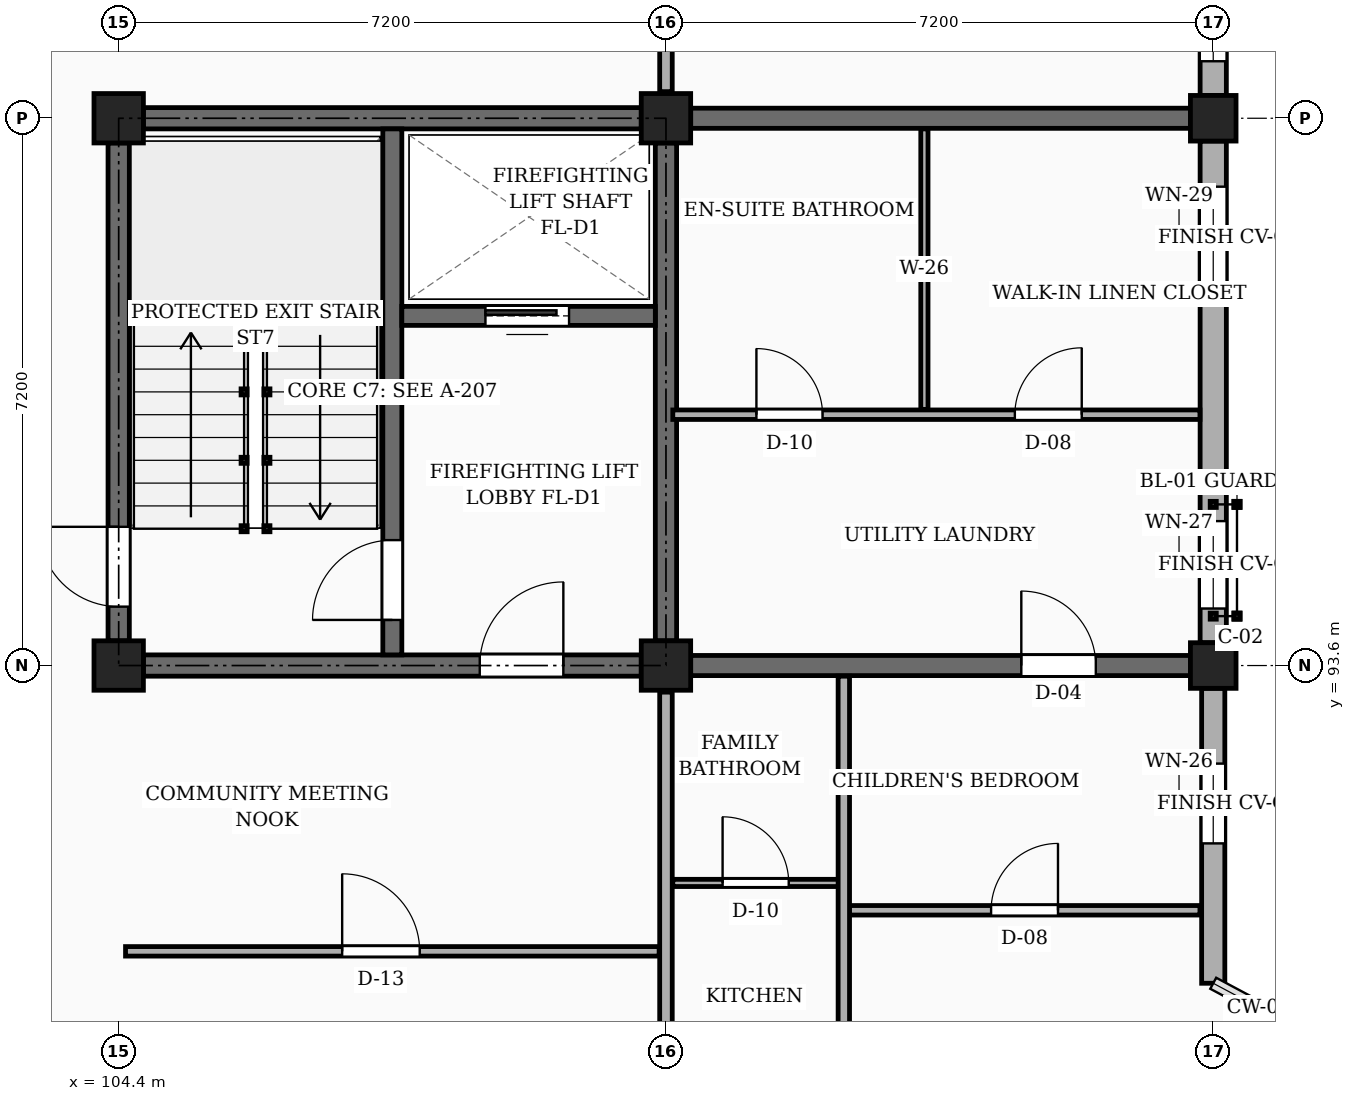
"""IFC4 building model, lengths in metres.
Left out: names, types, materials, properties, quantities, classifications, styles, units other than length and angle.
Written with IfcOpenShell. Run it as: python <this file> out.ifc"""

import sys

from ifc_helpers import new_model, si_unit, direction, frame, frame_2d, origin, origin_2d, place, context, subcontext, project, spatial, rectangle, extrude, element, fill, save


model = new_model("IFC4")
c1 = context("Model", 3, precision=1e-05, world=origin(), true_north=direction((0.0, 1.0)))
c2 = subcontext(c1, "Body", "Model", "MODEL_VIEW")
j1 = project(units=[si_unit("LENGTHUNIT", "METRE"), si_unit("PLANEANGLEUNIT", "RADIAN")], contexts=[c1])
p1 = place(None, origin())
s1 = spatial("IfcSite", under=j1, at=p1, CompositionType="ELEMENT")
p2 = place(p1, origin())
s2 = spatial("IfcBuilding", under=s1, at=p2, CompositionType="ELEMENT")
p3 = place(p2, frame((0.0, 0.0, 7.65)))
s3 = spatial("IfcBuildingStorey", under=s2, at=p3, CompositionType="ELEMENT", Elevation=7.65)
for number, where, z_axis, x_axis in (
    (1, (104.4, 93.6, 0.0), (0.0, 0.0, 1.0), (1.0, 0.0, 0.0)),
    (2, (104.4, 100.8, 0.0), (0.0, 0.0, 1.0), (1.0, 0.0, 0.0)),
    (3, (111.6, 93.6, 0.0), (0.0, 0.0, 1.0), (1.0, 0.0, 0.0)),
    (4, (111.6, 100.8, 0.0), (0.0, 0.0, 1.0), (1.0, 0.0, 0.0)),
):
    element("IfcColumn", number, at=place(p3, frame(where, z_axis=z_axis, x_axis=x_axis)), inside=s3, PredefinedType="COLUMN", context=c2, shape_type="SweptSolid", body=[
        extrude(rectangle(XDim=0.65, YDim=0.65, at=origin_2d()), origin(), (0.0, 0.0, 1.0), 3.15),
    ])
for number, where, z_axis, x_axis in (
    (5, (118.8, 93.6, 0.0), (0.0, 0.0, 1.0), (1.0, 0.0, 0.0)),
    (6, (118.8, 100.8, 0.0), (0.0, 0.0, 1.0), (1.0, 0.0, 0.0)),
):
    element("IfcColumn", number, at=place(p3, frame(where, z_axis=z_axis, x_axis=x_axis)), inside=s3, PredefinedType="COLUMN", context=c2, shape_type="SweptSolid", body=[
        extrude(rectangle(XDim=0.6, YDim=0.6, at=origin_2d()), origin(), (0.0, 0.0, 1.0), 3.15),
    ])
p4 = place(p3, frame((111.925, 93.6, 0.0), z_axis=(0.0, 0.0, 1.0), x_axis=(1.0, 0.0, 0.0)))
e7 = element("IfcWall", 7, at=p4, inside=s3, PredefinedType="SOLIDWALL", context=c2, shape_type="SweptSolid", body=[
    extrude(rectangle(XDim=6.575, YDim=0.265, at=frame_2d((3.288, 0.0))), origin(), (0.0, 0.0, 1.0), 2.19),
])
p5 = place(p4, frame((4.35, 0.0, 0.0)))
e8 = element("IfcOpeningElement", 8, at=p5, cuts=e7, PredefinedType="OPENING", context=c2, shape_type="SweptSolid", body=[
    extrude(rectangle(XDim=0.98, YDim=2.12, at=frame_2d((0.49, 1.06))), frame((0.0, 0.143, 0.0), z_axis=(0.0, -1.0, 0.0), x_axis=(1.0, 0.0, 0.0)), (0.0, 0.0, 1.0), 0.285),
])
p6 = place(p3, frame((111.925, 100.8, 0.0), z_axis=(0.0, 0.0, 1.0), x_axis=(1.0, 0.0, 0.0)))
e9 = element("IfcWall", 9, at=p6, inside=s3, PredefinedType="SOLIDWALL", context=c2, shape_type="SweptSolid", body=[
    extrude(rectangle(XDim=6.575, YDim=0.265, at=frame_2d((3.288, 0.0))), origin(), (0.0, 0.0, 1.0), 2.19),
])
p7 = place(p3, frame((118.8, 89.42, 0.0), z_axis=(0.0, 0.0, 1.0), x_axis=(0.0, 1.0, 0.0)))
e10 = element("IfcWall", 10, at=p7, inside=s3, PredefinedType="SOLIDWALL", context=c2, shape_type="SweptSolid", body=[
    extrude(rectangle(XDim=3.88, YDim=0.305, at=frame_2d((1.94, 0.0))), origin(), (0.0, 0.0, 1.0), 2.46),
])
p8 = place(p7, frame((1.84, 0.0, 0.78)))
e11 = element("IfcOpeningElement", 11, at=p8, cuts=e10, PredefinedType="OPENING", context=c2, shape_type="SweptSolid", body=[
    extrude(rectangle(XDim=1.05, YDim=1.44, at=frame_2d((0.525, 0.72))), frame((0.0, 0.163, 0.0), z_axis=(0.0, -1.0, 0.0), x_axis=(1.0, 0.0, 0.0)), (0.0, 0.0, 1.0), 0.325),
])
p9 = place(p3, frame((118.8, 93.9, 0.0), z_axis=(0.0, 0.0, 1.0), x_axis=(0.0, 1.0, 0.0)))
e12 = element("IfcWall", 12, at=p9, inside=s3, PredefinedType="SOLIDWALL", context=c2, shape_type="SweptSolid", body=[
    extrude(rectangle(XDim=6.6, YDim=0.345, at=frame_2d((3.3, 0.0))), origin(), (0.0, 0.0, 1.0), 2.46),
])
p10 = place(p9, frame((0.45, 0.0, 0.78)))
e13 = element("IfcOpeningElement", 13, at=p10, cuts=e12, PredefinedType="OPENING", context=c2, shape_type="SweptSolid", body=[
    extrude(rectangle(XDim=1.15, YDim=1.44, at=frame_2d((0.575, 0.72))), frame((0.0, 0.183, 0.0), z_axis=(0.0, -1.0, 0.0), x_axis=(1.0, 0.0, 0.0)), (0.0, 0.0, 1.0), 0.365),
])
p11 = place(p9, frame((4.65, 0.0, 0.78)))
e14 = element("IfcOpeningElement", 14, at=p11, cuts=e12, PredefinedType="OPENING", context=c2, shape_type="SweptSolid", body=[
    extrude(rectangle(XDim=1.35, YDim=1.44, at=frame_2d((0.675, 0.72))), frame((0.0, 0.183, 0.0), z_axis=(0.0, -1.0, 0.0), x_axis=(1.0, 0.0, 0.0)), (0.0, 0.0, 1.0), 0.365),
])
p12 = place(p3, frame((118.8, 101.1, 0.0), z_axis=(0.0, 0.0, 1.0), x_axis=(0.0, 1.0, 0.0)))
e15 = element("IfcWall", 15, at=p12, inside=s3, PredefinedType="SOLIDWALL", context=c2, shape_type="SweptSolid", body=[
    extrude(rectangle(XDim=6.6, YDim=0.345, at=frame_2d((3.3, 0.0))), origin(), (0.0, 0.0, 1.0), 2.46),
])
p13 = place(p12, frame((0.45, 0.0, 0.78)))
e16 = element("IfcOpeningElement", 16, at=p13, cuts=e15, PredefinedType="OPENING", context=c2, shape_type="SweptSolid", body=[
    extrude(rectangle(XDim=1.35, YDim=1.44, at=frame_2d((0.675, 0.72))), frame((0.0, 0.183, 0.0), z_axis=(0.0, -1.0, 0.0), x_axis=(1.0, 0.0, 0.0)), (0.0, 0.0, 1.0), 0.365),
])
p14 = place(p12, frame((4.65, 0.0, 0.78)))
e17 = element("IfcOpeningElement", 17, at=p14, cuts=e15, PredefinedType="OPENING", context=c2, shape_type="SweptSolid", body=[
    extrude(rectangle(XDim=0.85, YDim=1.15, at=frame_2d((0.425, 0.575))), frame((0.0, 0.183, 0.0), z_axis=(0.0, -1.0, 0.0), x_axis=(1.0, 0.0, 0.0)), (0.0, 0.0, 1.0), 0.365),
])
p15 = place(p3, frame((104.4, 93.925, 0.0), z_axis=(0.0, 0.0, 1.0), x_axis=(0.0, 1.0, 0.0)))
e18 = element("IfcWall", 18, at=p15, inside=s3, PredefinedType="SHEAR", context=c2, shape_type="SweptSolid", body=[
    extrude(rectangle(XDim=6.55, YDim=0.28, at=frame_2d((3.275, 0.0))), origin(), (0.0, 0.0, 1.0), 2.89),
])
p16 = place(p15, frame((0.45, 0.0, 0.0)))
e19 = element("IfcOpeningElement", 19, at=p16, cuts=e18, PredefinedType="OPENING", context=c2, shape_type="SweptSolid", body=[
    extrude(rectangle(XDim=1.05, YDim=2.15, at=frame_2d((0.525, 1.075))), frame((0.0, 0.15, 0.0), z_axis=(0.0, -1.0, 0.0), x_axis=(1.0, 0.0, 0.0)), (0.0, 0.0, 1.0), 0.3),
])
p17 = place(p3, frame((104.725, 100.8, 0.0), z_axis=(0.0, 0.0, 1.0), x_axis=(1.0, 0.0, 0.0)))
e20 = element("IfcWall", 20, at=p17, inside=s3, PredefinedType="SHEAR", context=c2, shape_type="SweptSolid", body=[
    extrude(rectangle(XDim=6.55, YDim=0.28, at=frame_2d((3.275, 0.0))), origin(), (0.0, 0.0, 1.0), 2.89),
])
p18 = place(p3, frame((111.6, 93.925, 0.0), z_axis=(0.0, 0.0, 1.0), x_axis=(0.0, 1.0, 0.0)))
e21 = element("IfcWall", 21, at=p18, inside=s3, PredefinedType="SHEAR", context=c2, shape_type="SweptSolid", body=[
    extrude(rectangle(XDim=6.55, YDim=0.28, at=frame_2d((3.275, 0.0))), origin(), (0.0, 0.0, 1.0), 2.89),
])
p19 = place(p3, frame((104.725, 93.6, 0.0), z_axis=(0.0, 0.0, 1.0), x_axis=(1.0, 0.0, 0.0)))
e22 = element("IfcWall", 22, at=p19, inside=s3, PredefinedType="SHEAR", context=c2, shape_type="SweptSolid", body=[
    extrude(rectangle(XDim=6.55, YDim=0.28, at=frame_2d((3.275, 0.0))), origin(), (0.0, 0.0, 1.0), 2.89),
])
p20 = place(p19, frame((4.425, 0.0, 0.0)))
e23 = element("IfcOpeningElement", 23, at=p20, cuts=e22, PredefinedType="OPENING", context=c2, shape_type="SweptSolid", body=[
    extrude(rectangle(XDim=1.1, YDim=2.15, at=frame_2d((0.55, 1.075))), frame((0.0, 0.15, 0.0), z_axis=(0.0, -1.0, 0.0), x_axis=(1.0, 0.0, 0.0)), (0.0, 0.0, 1.0), 0.3),
])
p21 = place(p3, frame((108.0, 93.74, 0.0), z_axis=(0.0, 0.0, 1.0), x_axis=(0.0, 1.0, 0.0)))
e24 = element("IfcWall", 24, at=p21, inside=s3, PredefinedType="SHEAR", context=c2, shape_type="SweptSolid", body=[
    extrude(rectangle(XDim=6.92, YDim=0.25, at=frame_2d((3.46, 0.0))), origin(), (0.0, 0.0, 1.0), 2.89),
])
p22 = place(p21, frame((0.46, 0.0, 0.0)))
e25 = element("IfcOpeningElement", 25, at=p22, cuts=e24, PredefinedType="OPENING", context=c2, shape_type="SweptSolid", body=[
    extrude(rectangle(XDim=1.05, YDim=2.15, at=frame_2d((0.525, 1.075))), frame((0.0, 0.135, 0.0), z_axis=(0.0, -1.0, 0.0), x_axis=(1.0, 0.0, 0.0)), (0.0, 0.0, 1.0), 0.27),
])
p23 = place(p3, frame((108.125, 98.2, 0.0), z_axis=(0.0, 0.0, 1.0), x_axis=(1.0, 0.0, 0.0)))
e26 = element("IfcWall", 26, at=p23, inside=s3, PredefinedType="SHEAR", context=c2, shape_type="SweptSolid", body=[
    extrude(rectangle(XDim=3.335, YDim=0.25, at=frame_2d((1.667, 0.0))), origin(), (0.0, 0.0, 1.0), 2.89),
])
p24 = place(p23, frame((1.1, 0.0, 0.0)))
e27 = element("IfcOpeningElement", 27, at=p24, cuts=e26, PredefinedType="OPENING", context=c2, shape_type="SweptSolid", body=[
    extrude(rectangle(XDim=1.1, YDim=2.2, at=frame_2d((0.55, 1.1))), frame((0.0, 0.135, 0.0), z_axis=(0.0, -1.0, 0.0), x_axis=(1.0, 0.0, 0.0)), (0.0, 0.0, 1.0), 0.27),
])
p25 = place(p3, frame((111.6, 86.75, 0.0), z_axis=(0.0, 0.0, 1.0), x_axis=(0.0, 1.0, 0.0)))
e28 = element("IfcWall", 28, at=p25, inside=s3, PredefinedType="PARTITIONING", context=c2, shape_type="SweptSolid", body=[
    extrude(rectangle(XDim=6.5, YDim=0.165, at=frame_2d((3.25, 0.0))), origin(), (0.0, 0.0, 1.0), 2.24),
])
p26 = place(p25, frame((1.0, 0.0, 0.0)))
e29 = element("IfcOpeningElement", 29, at=p26, cuts=e28, PredefinedType="OPENING", context=c2, shape_type="SweptSolid", body=[
    extrude(rectangle(XDim=1.14, YDim=2.18, at=frame_2d((0.57, 1.09))), frame((0.0, 0.093, 0.0), z_axis=(0.0, -1.0, 0.0), x_axis=(1.0, 0.0, 0.0)), (0.0, 0.0, 1.0), 0.185),
])
p27 = place(p3, frame((111.6, 101.15, 0.0), z_axis=(0.0, 0.0, 1.0), x_axis=(0.0, 1.0, 0.0)))
e30 = element("IfcWall", 30, at=p27, inside=s3, PredefinedType="PARTITIONING", context=c2, shape_type="SweptSolid", body=[
    extrude(rectangle(XDim=6.5, YDim=0.165, at=frame_2d((3.25, 0.0))), origin(), (0.0, 0.0, 1.0), 2.24),
])
p28 = place(p27, frame((1.1, 0.0, 0.0)))
e31 = element("IfcOpeningElement", 31, at=p28, cuts=e30, PredefinedType="OPENING", context=c2, shape_type="SweptSolid", body=[
    extrude(rectangle(XDim=1.0, YDim=2.15, at=frame_2d((0.5, 1.075))), frame((0.0, 0.093, 0.0), z_axis=(0.0, -1.0, 0.0), x_axis=(1.0, 0.0, 0.0)), (0.0, 0.0, 1.0), 0.185),
])
p29 = place(p3, frame((104.49, 89.84, 0.0), z_axis=(0.0, 0.0, 1.0), x_axis=(1.0, 0.0, 0.0)))
e32 = element("IfcWall", 32, at=p29, inside=s3, PredefinedType="PARTITIONING", context=c2, shape_type="SweptSolid", body=[
    extrude(rectangle(XDim=7.02, YDim=0.125, at=frame_2d((3.51, 0.0))), origin(), (0.0, 0.0, 1.0), 2.325),
])
p30 = place(p29, frame((2.85, 0.0, 0.0)))
e33 = element("IfcOpeningElement", 33, at=p30, cuts=e32, PredefinedType="OPENING", context=c2, shape_type="SweptSolid", body=[
    extrude(rectangle(XDim=1.02, YDim=2.15, at=frame_2d((0.51, 1.075))), frame((0.0, 0.073, 0.0), z_axis=(0.0, -1.0, 0.0), x_axis=(1.0, 0.0, 0.0)), (0.0, 0.0, 1.0), 0.145),
])
p31 = place(p3, frame((114.01, 90.38, 0.0), z_axis=(0.0, 0.0, 1.0), x_axis=(1.0, 0.0, 0.0)))
e34 = element("IfcWall", 34, at=p31, inside=s3, PredefinedType="PARTITIONING", context=c2, shape_type="SweptSolid", body=[
    extrude(rectangle(XDim=4.615, YDim=0.125, at=frame_2d((2.308, 0.0))), origin(), (0.0, 0.0, 1.0), 2.325),
])
p32 = place(p31, frame((1.867, 0.0, 0.0)))
e35 = element("IfcOpeningElement", 35, at=p32, cuts=e34, PredefinedType="OPENING", context=c2, shape_type="SweptSolid", body=[
    extrude(rectangle(XDim=0.88, YDim=2.08, at=frame_2d((0.44, 1.04))), frame((0.0, 0.073, 0.0), z_axis=(0.0, -1.0, 0.0), x_axis=(1.0, 0.0, 0.0)), (0.0, 0.0, 1.0), 0.145),
])
p33 = place(p3, frame((111.69, 90.74, 0.0), z_axis=(0.0, 0.0, 1.0), x_axis=(1.0, 0.0, 0.0)))
e36 = element("IfcWall", 36, at=p33, inside=s3, PredefinedType="PARTITIONING", context=c2, shape_type="SweptSolid", body=[
    extrude(rectangle(XDim=2.18, YDim=0.095, at=frame_2d((1.09, 0.0))), origin(), (0.0, 0.0, 1.0), 2.325),
])
p34 = place(p33, frame((0.655, 0.0, 0.0)))
e37 = element("IfcOpeningElement", 37, at=p34, cuts=e36, PredefinedType="OPENING", context=c2, shape_type="SweptSolid", body=[
    extrude(rectangle(XDim=0.87, YDim=2.05, at=frame_2d((0.435, 1.025))), frame((0.0, 0.058, 0.0), z_axis=(0.0, -1.0, 0.0), x_axis=(1.0, 0.0, 0.0)), (0.0, 0.0, 1.0), 0.115),
])
p35 = place(p3, frame((113.94, 86.575, 0.0), z_axis=(0.0, 0.0, 1.0), x_axis=(0.0, 1.0, 0.0)))
e38 = element("IfcWall", 38, at=p35, inside=s3, PredefinedType="PARTITIONING", context=c2, shape_type="SweptSolid", body=[
    extrude(rectangle(XDim=6.885, YDim=0.15, at=frame_2d((3.442, 0.0))), origin(), (0.0, 0.0, 1.0), 2.325),
])
p36 = place(p35, frame((1.275, 0.0, 0.0)))
e39 = element("IfcOpeningElement", 39, at=p36, cuts=e38, PredefinedType="OPENING", context=c2, shape_type="SweptSolid", body=[
    extrude(rectangle(XDim=0.92, YDim=2.1, at=frame_2d((0.46, 1.05))), frame((0.0, 0.085, 0.0), z_axis=(0.0, -1.0, 0.0), x_axis=(1.0, 0.0, 0.0)), (0.0, 0.0, 1.0), 0.17),
])
p37 = place(p3, frame((111.69, 96.9, 0.0), z_axis=(0.0, 0.0, 1.0), x_axis=(1.0, 0.0, 0.0)))
e40 = element("IfcWall", 40, at=p37, inside=s3, PredefinedType="PARTITIONING", context=c2, shape_type="SweptSolid", body=[
    extrude(rectangle(XDim=6.935, YDim=0.125, at=frame_2d((3.468, 0.0))), origin(), (0.0, 0.0, 1.0), 2.325),
])
p38 = place(p37, frame((1.1, 0.0, 0.0)))
e41 = element("IfcOpeningElement", 41, at=p38, cuts=e40, PredefinedType="OPENING", context=c2, shape_type="SweptSolid", body=[
    extrude(rectangle(XDim=0.87, YDim=2.05, at=frame_2d((0.435, 1.025))), frame((0.0, 0.073, 0.0), z_axis=(0.0, -1.0, 0.0), x_axis=(1.0, 0.0, 0.0)), (0.0, 0.0, 1.0), 0.145),
])
p39 = place(p37, frame((4.5, 0.0, 0.0)))
e42 = element("IfcOpeningElement", 42, at=p39, cuts=e40, PredefinedType="OPENING", context=c2, shape_type="SweptSolid", body=[
    extrude(rectangle(XDim=0.88, YDim=2.08, at=frame_2d((0.44, 1.04))), frame((0.0, 0.073, 0.0), z_axis=(0.0, -1.0, 0.0), x_axis=(1.0, 0.0, 0.0)), (0.0, 0.0, 1.0), 0.145),
])
p40 = place(p3, frame((115.0, 96.97, 0.0), z_axis=(0.0, 0.0, 1.0), x_axis=(0.0, 1.0, 0.0)))
e43 = element("IfcWall", 43, at=p40, inside=s3, PredefinedType="PARTITIONING", context=c2, shape_type="SweptSolid", body=[
    extrude(rectangle(XDim=3.69, YDim=0.095, at=frame_2d((1.845, 0.0))), origin(), (0.0, 0.0, 1.0), 2.325),
])
p41 = place(p8, origin())
e44 = element("IfcWindow", 44, at=p41, inside=s3, PartitioningType="SINGLE_PANEL", PredefinedType="WINDOW", context=c2, shape_type="SweptSolid", body=[
    extrude(rectangle(XDim=1.05, YDim=1.44, at=frame_2d((0.525, 0.72))), frame((0.0, 0.03, 0.0), z_axis=(0.0, -1.0, 0.0), x_axis=(1.0, 0.0, 0.0)), (0.0, 0.0, 1.0), 0.06),
])
fill(e11, e44)
p42 = place(p10, origin())
e45 = element("IfcWindow", 45, at=p42, inside=s3, PartitioningType="SINGLE_PANEL", PredefinedType="WINDOW", context=c2, shape_type="SweptSolid", body=[
    extrude(rectangle(XDim=1.15, YDim=1.44, at=frame_2d((0.575, 0.72))), frame((0.0, 0.03, 0.0), z_axis=(0.0, -1.0, 0.0), x_axis=(1.0, 0.0, 0.0)), (0.0, 0.0, 1.0), 0.06),
])
fill(e13, e45)
p43 = place(p11, origin())
e46 = element("IfcWindow", 46, at=p43, inside=s3, PartitioningType="SINGLE_PANEL", PredefinedType="WINDOW", context=c2, shape_type="SweptSolid", body=[
    extrude(rectangle(XDim=1.35, YDim=1.44, at=frame_2d((0.675, 0.72))), frame((0.0, 0.03, 0.0), z_axis=(0.0, -1.0, 0.0), x_axis=(1.0, 0.0, 0.0)), (0.0, 0.0, 1.0), 0.06),
])
fill(e14, e46)
p44 = place(p13, origin())
e47 = element("IfcWindow", 47, at=p44, inside=s3, PartitioningType="SINGLE_PANEL", PredefinedType="WINDOW", context=c2, shape_type="SweptSolid", body=[
    extrude(rectangle(XDim=1.35, YDim=1.44, at=frame_2d((0.675, 0.72))), frame((0.0, 0.03, 0.0), z_axis=(0.0, -1.0, 0.0), x_axis=(1.0, 0.0, 0.0)), (0.0, 0.0, 1.0), 0.06),
])
fill(e16, e47)
p45 = place(p16, origin())
e48 = element("IfcDoor", 48, at=p45, inside=s3, OperationType="SINGLE_SWING_RIGHT", PredefinedType="DOOR", context=c2, shape_type="SweptSolid", body=[
    extrude(rectangle(XDim=1.05, YDim=2.15, at=frame_2d((0.525, 1.075))), frame((0.0, 0.025, 0.0), z_axis=(0.0, -1.0, 0.0), x_axis=(1.0, 0.0, 0.0)), (0.0, 0.0, 1.0), 0.05),
])
fill(e19, e48)
p46 = place(p20, frame((1.1, 0.0, 0.0), z_axis=(0.0, 0.0, 1.0), x_axis=(-1.0, 0.0, 0.0)))
e49 = element("IfcDoor", 49, at=p46, inside=s3, OperationType="SINGLE_SWING_RIGHT", PredefinedType="DOOR", context=c2, shape_type="SweptSolid", body=[
    extrude(rectangle(XDim=1.1, YDim=2.15, at=frame_2d((0.55, 1.075))), frame((0.0, 0.025, 0.0), z_axis=(0.0, -1.0, 0.0), x_axis=(1.0, 0.0, 0.0)), (0.0, 0.0, 1.0), 0.05),
])
fill(e23, e49)
p47 = place(p22, origin())
e50 = element("IfcDoor", 50, at=p47, inside=s3, OperationType="SINGLE_SWING_LEFT", PredefinedType="DOOR", context=c2, shape_type="SweptSolid", body=[
    extrude(rectangle(XDim=1.05, YDim=2.15, at=frame_2d((0.525, 1.075))), frame((0.0, 0.025, 0.0), z_axis=(0.0, -1.0, 0.0), x_axis=(1.0, 0.0, 0.0)), (0.0, 0.0, 1.0), 0.05),
])
fill(e25, e50)
p48 = place(p24, origin())
e51 = element("IfcDoor", 51, at=p48, inside=s3, OperationType="SLIDING_TO_LEFT", PredefinedType="DOOR", context=c2, shape_type="SweptSolid", body=[
    extrude(rectangle(XDim=1.1, YDim=2.2, at=frame_2d((0.55, 1.1))), frame((0.0, 0.025, 0.0), z_axis=(0.0, -1.0, 0.0), x_axis=(1.0, 0.0, 0.0)), (0.0, 0.0, 1.0), 0.05),
])
fill(e27, e51)
p49 = place(p30, origin())
e52 = element("IfcDoor", 52, at=p49, inside=s3, OperationType="SINGLE_SWING_LEFT", PredefinedType="DOOR", context=c2, shape_type="SweptSolid", body=[
    extrude(rectangle(XDim=1.02, YDim=2.15, at=frame_2d((0.51, 1.075))), frame((0.0, 0.025, 0.0), z_axis=(0.0, -1.0, 0.0), x_axis=(1.0, 0.0, 0.0)), (0.0, 0.0, 1.0), 0.05),
])
fill(e33, e52)
p50 = place(p32, origin())
e53 = element("IfcDoor", 53, at=p50, inside=s3, OperationType="SINGLE_SWING_RIGHT", PredefinedType="DOOR", context=c2, shape_type="SweptSolid", body=[
    extrude(rectangle(XDim=0.88, YDim=2.08, at=frame_2d((0.44, 1.04))), frame((0.0, 0.025, 0.0), z_axis=(0.0, -1.0, 0.0), x_axis=(1.0, 0.0, 0.0)), (0.0, 0.0, 1.0), 0.05),
])
fill(e35, e53)
p51 = place(p34, origin())
e54 = element("IfcDoor", 54, at=p51, inside=s3, OperationType="SINGLE_SWING_LEFT", PredefinedType="DOOR", context=c2, shape_type="SweptSolid", body=[
    extrude(rectangle(XDim=0.87, YDim=2.05, at=frame_2d((0.435, 1.025))), frame((0.0, 0.025, 0.0), z_axis=(0.0, -1.0, 0.0), x_axis=(1.0, 0.0, 0.0)), (0.0, 0.0, 1.0), 0.05),
])
fill(e37, e54)
p52 = place(p38, origin())
e55 = element("IfcDoor", 55, at=p52, inside=s3, OperationType="SINGLE_SWING_LEFT", PredefinedType="DOOR", context=c2, shape_type="SweptSolid", body=[
    extrude(rectangle(XDim=0.87, YDim=2.05, at=frame_2d((0.435, 1.025))), frame((0.0, 0.025, 0.0), z_axis=(0.0, -1.0, 0.0), x_axis=(1.0, 0.0, 0.0)), (0.0, 0.0, 1.0), 0.05),
])
fill(e41, e55)
p53 = place(p39, origin())
e56 = element("IfcDoor", 56, at=p53, inside=s3, OperationType="SINGLE_SWING_RIGHT", PredefinedType="DOOR", context=c2, shape_type="SweptSolid", body=[
    extrude(rectangle(XDim=0.88, YDim=2.08, at=frame_2d((0.44, 1.04))), frame((0.0, 0.025, 0.0), z_axis=(0.0, -1.0, 0.0), x_axis=(1.0, 0.0, 0.0)), (0.0, 0.0, 1.0), 0.05),
])
fill(e42, e56)
p54 = place(p5, origin())
e57 = element("IfcDoor", 57, at=p54, inside=s3, OperationType="SINGLE_SWING_LEFT", PredefinedType="DOOR", context=c2, shape_type="SweptSolid", body=[
    extrude(rectangle(XDim=0.98, YDim=2.12, at=frame_2d((0.49, 1.06))), frame((0.0, 0.025, 0.0), z_axis=(0.0, -1.0, 0.0), x_axis=(1.0, 0.0, 0.0)), (0.0, 0.0, 1.0), 0.05),
])
fill(e8, e57)
save(model, sys.argv[1])
